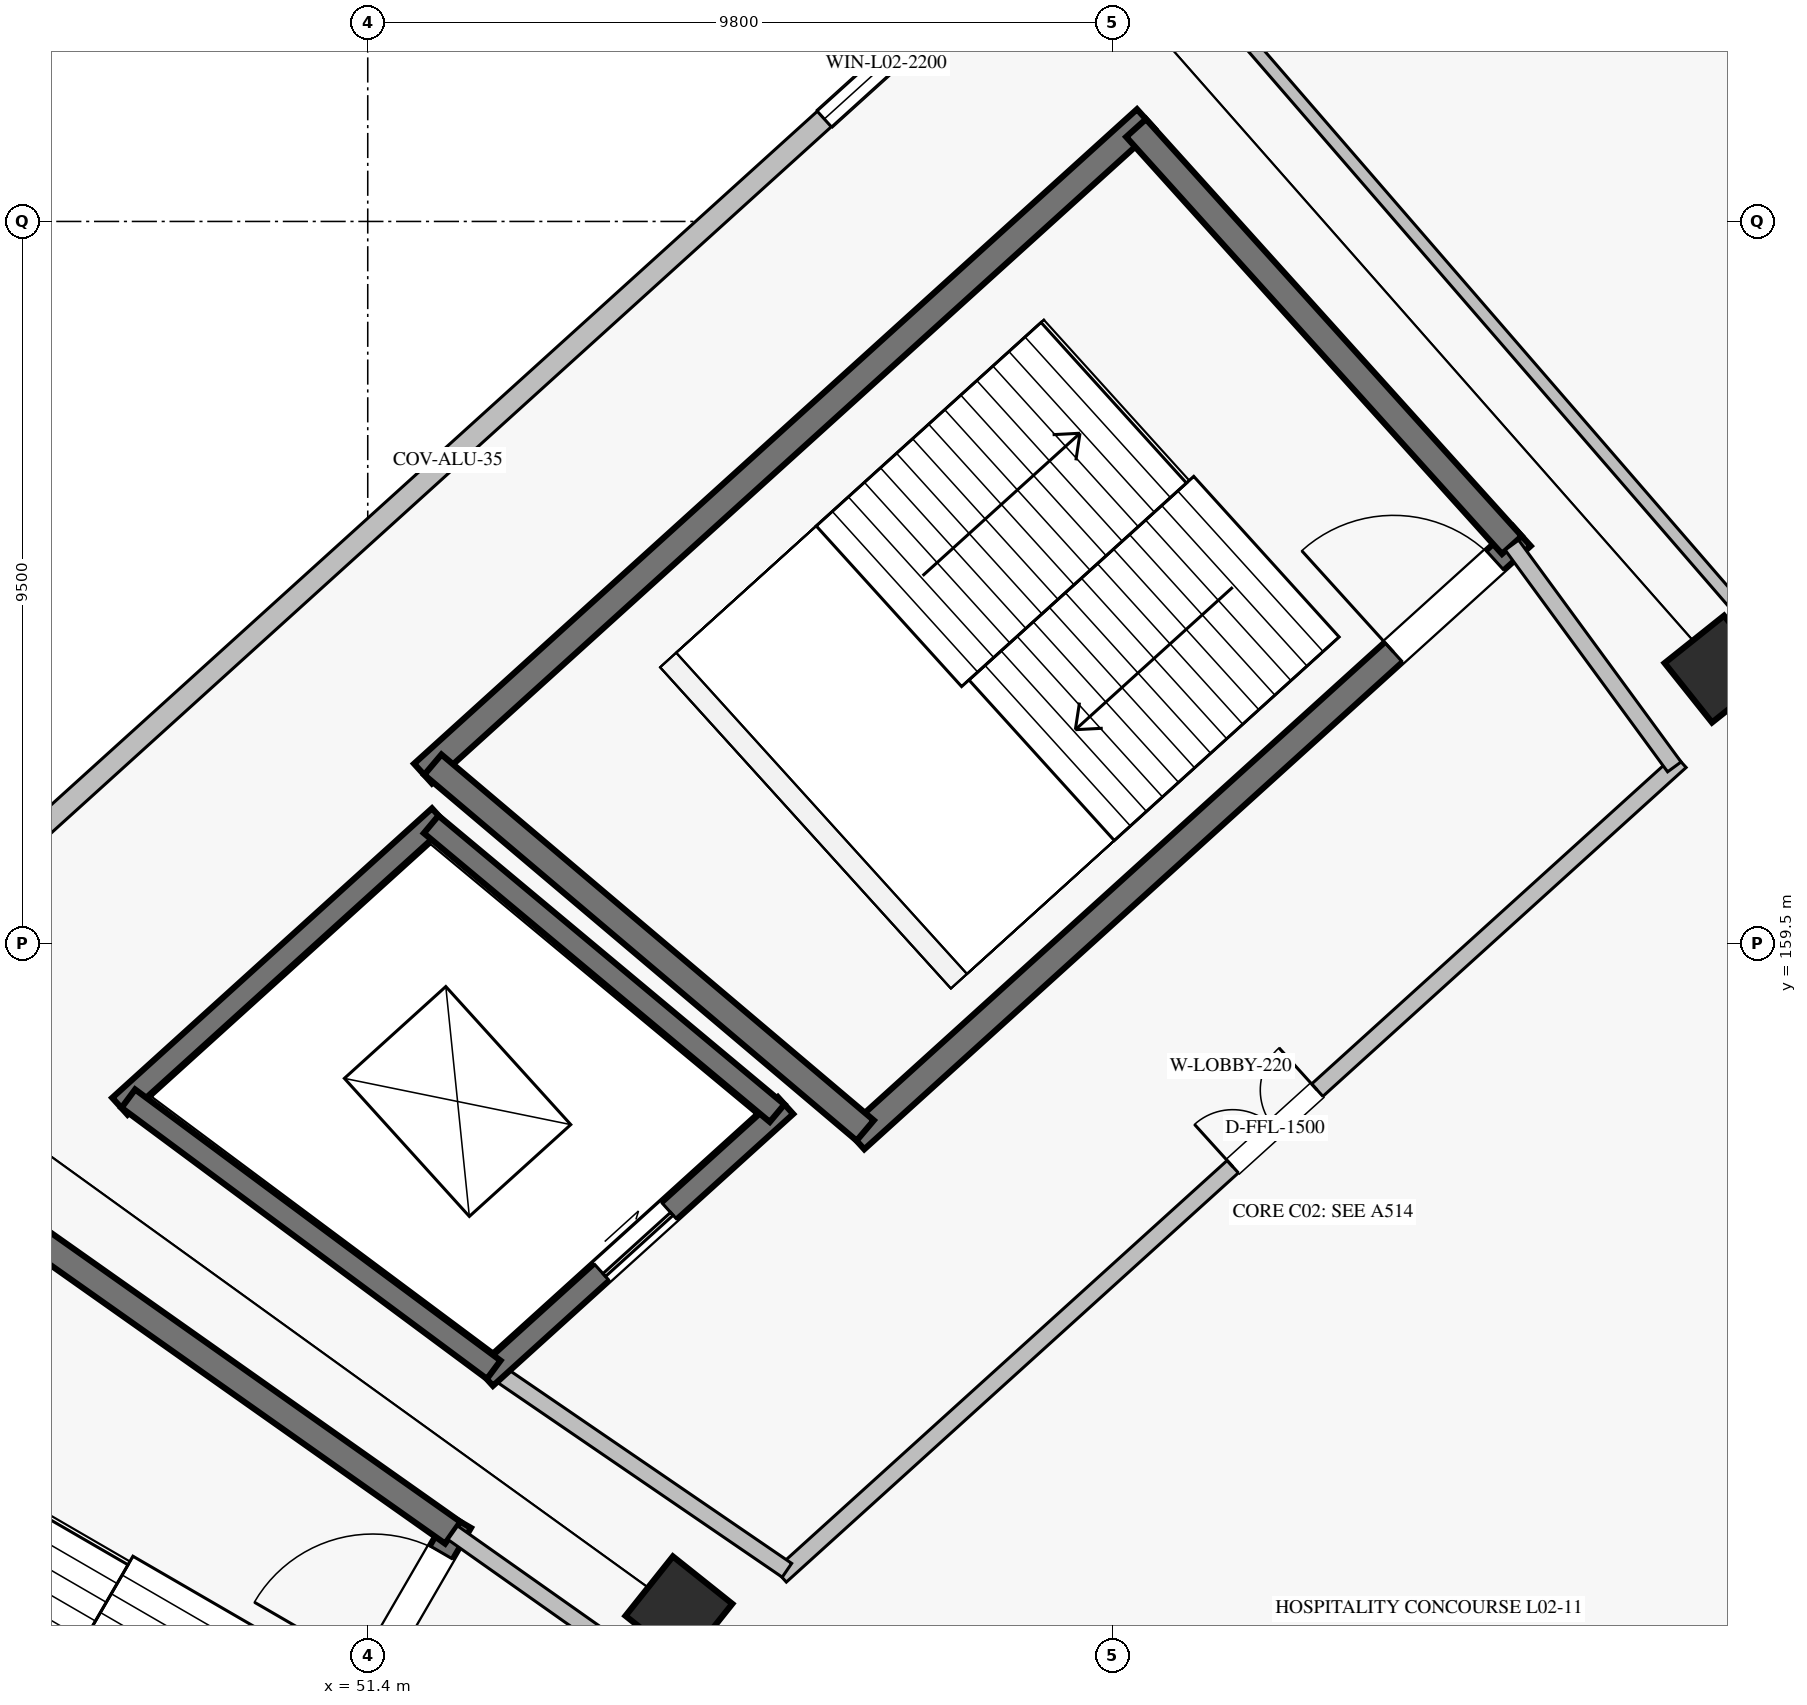
"""IFC4 building model, lengths in metres.
Left out: names, types, materials, properties, quantities, classifications, styles, units other than length and angle.
Written with IfcOpenShell. Run it as: python <this file> out.ifc"""

import sys

from ifc_helpers import new_model, si_unit, direction, frame, frame_2d, origin, origin_2d, place, context, subcontext, project, spatial, rectangle, extrude, element, fill, save


model = new_model("IFC4")
c1 = context("Model", 3, precision=1e-05, world=origin(), true_north=direction((0.0, 1.0)))
c2 = subcontext(c1, "Body", "Model", "MODEL_VIEW")
j1 = project(units=[si_unit("LENGTHUNIT", "METRE"), si_unit("PLANEANGLEUNIT", "RADIAN")], contexts=[c1])
p1 = place(None, origin())
s1 = spatial("IfcSite", under=j1, at=p1, CompositionType="ELEMENT")
p2 = place(p1, origin())
s2 = spatial("IfcBuilding", under=s1, at=p2, CompositionType="ELEMENT")
p3 = place(p2, frame((0.0, 0.0, 10.54)))
s3 = spatial("IfcBuildingStorey", under=s2, at=p3, CompositionType="ELEMENT", Elevation=10.54)
for number, where, z_axis, x_axis in (
    (1, (69.166, 163.111, 0.0), (0.0, 0.0, 1.0), (-0.623, 0.782, 0.0)),
    (2, (55.494, 150.734, 0.0), (0.0, 0.0, 1.0), (-0.782, 0.623, 0.0)),
):
    element("IfcColumn", number, at=place(p3, frame(where, z_axis=z_axis, x_axis=x_axis)), inside=s3, PredefinedType="COLUMN", context=c2, shape_type="SweptSolid", body=[
        extrude(rectangle(XDim=1.0, YDim=1.0, at=origin_2d()), origin(), (0.0, 0.0, 1.0), 5.1),
    ])
p4 = place(p3, frame((60.076, 172.764, 0.0), z_axis=(0.0, 0.0, 1.0), x_axis=(-0.741352367697, -0.671115986183, 0.0)))
e3 = element("IfcWall", 3, at=p4, inside=s3, PredefinedType="SOLIDWALL", context=c2, shape_type="SweptSolid", body=[
    extrude(rectangle(XDim=20.564, YDim=0.275, at=frame_2d((10.282, 0.0))), origin(), (0.0, 0.0, 1.0), 4.138),
])
p5 = place(p4, frame((1.4, 0.0, 1.0)))
e4 = element("IfcOpeningElement", 4, at=p5, cuts=e3, PredefinedType="OPENING", context=c2, shape_type="SweptSolid", body=[
    extrude(rectangle(XDim=2.2, YDim=1.7, at=frame_2d((1.1, 0.85))), frame((0.0, 0.147, 0.0), z_axis=(0.0, -1.0, 0.0), x_axis=(1.0, 0.0, 0.0)), (0.0, 0.0, 1.0), 0.295),
])
p6 = place(p3, frame((66.583, 164.86, 0.0), z_axis=(0.0, 0.0, 1.0), x_axis=(-0.741348929385, -0.671119784315, 0.0)))
e5 = element("IfcWall", 5, at=p6, inside=s3, PredefinedType="SHEAR", context=c2, shape_type="SweptSolid", body=[
    extrude(rectangle(XDim=11.826, YDim=0.35, at=frame_2d((5.913, 0.0))), origin(), (0.0, 0.0, 1.0), 4.84),
])
p7 = place(p6, frame((0.475, 0.0, 0.0)))
e6 = element("IfcOpeningElement", 6, at=p7, cuts=e5, PredefinedType="OPENING", context=c2, shape_type="SweptSolid", body=[
    extrude(rectangle(XDim=1.8, YDim=2.2, at=frame_2d((0.9, 1.1))), frame((0.0, 0.185, 0.0), z_axis=(0.0, -1.0, 0.0), x_axis=(1.0, 0.0, 0.0)), (0.0, 0.0, 1.0), 0.37),
])
p8 = place(p3, frame((61.639, 170.347, 0.0), z_axis=(0.0, 0.0, 1.0), x_axis=(-0.741351373721, -0.671117084183, 0.0)))
e7 = element("IfcWall", 7, at=p8, inside=s3, PredefinedType="SHEAR", context=c2, shape_type="SweptSolid", body=[
    extrude(rectangle(XDim=12.83, YDim=0.35, at=frame_2d((6.415, 0.0))), origin(), (0.0, 0.0, 1.0), 4.84),
])
p9 = place(p3, frame((66.454, 164.743, 0.0), z_axis=(0.0, 0.0, 1.0), x_axis=(-0.669463145673, 0.742845270958, 0.0)))
e8 = element("IfcWall", 8, at=p9, inside=s3, PredefinedType="SHEAR", context=c2, shape_type="SweptSolid", body=[
    extrude(rectangle(XDim=7.386, YDim=0.35, at=frame_2d((3.693, 0.0))), origin(), (0.0, 0.0, 1.0), 4.84),
])
p10 = place(p3, frame((57.945, 157.041, 0.0), z_axis=(0.0, 0.0, 1.0), x_axis=(-0.763422324031, 0.64589964791, 0.0)))
e9 = element("IfcWall", 9, at=p10, inside=s3, PredefinedType="SHEAR", context=c2, shape_type="SweptSolid", body=[
    extrude(rectangle(XDim=7.452, YDim=0.35, at=frame_2d((3.726, 0.0))), origin(), (0.0, 0.0, 1.0), 4.84),
])
p11 = place(p3, frame((56.897, 157.369, 0.0), z_axis=(0.0, 0.0, 1.0), x_axis=(-0.741350155641, -0.671118429736, 0.0)))
e10 = element("IfcWall", 10, at=p11, inside=s3, PredefinedType="SHEAR", context=c2, shape_type="SweptSolid", body=[
    extrude(rectangle(XDim=5.329, YDim=0.3, at=frame_2d((2.665, 0.0))), origin(), (0.0, 0.0, 1.0), 4.84),
])
p12 = place(p11, frame((2.065, 0.0, 0.0)))
e11 = element("IfcOpeningElement", 11, at=p12, cuts=e10, PredefinedType="OPENING", context=c2, shape_type="SweptSolid", body=[
    extrude(rectangle(XDim=1.2, YDim=2.2, at=frame_2d((0.6, 1.1))), frame((0.0, 0.16, 0.0), z_axis=(0.0, -1.0, 0.0), x_axis=(1.0, 0.0, 0.0)), (0.0, 0.0, 1.0), 0.32),
])
p13 = place(p3, frame((52.346, 161.168, 0.0), z_axis=(0.0, 0.0, 1.0), x_axis=(-0.74134208775, -0.671127341815, 0.0)))
e12 = element("IfcWall", 12, at=p13, inside=s3, PredefinedType="SHEAR", context=c2, shape_type="SweptSolid", body=[
    extrude(rectangle(XDim=5.675, YDim=0.3, at=frame_2d((2.837, 0.0))), origin(), (0.0, 0.0, 1.0), 4.84),
])
p14 = place(p3, frame((56.786, 157.268, 0.0), z_axis=(0.0, 0.0, 1.0), x_axis=(-0.767711354146, 0.640795815151, 0.0)))
e13 = element("IfcWall", 13, at=p14, inside=s3, PredefinedType="SHEAR", context=c2, shape_type="SweptSolid", body=[
    extrude(rectangle(XDim=5.929, YDim=0.3, at=frame_2d((2.964, 0.0))), origin(), (0.0, 0.0, 1.0), 4.84),
])
p15 = place(p3, frame((53.058, 153.893, 0.0), z_axis=(0.0, 0.0, 1.0), x_axis=(-0.803101805449, 0.59584183311, 0.0)))
e14 = element("IfcWall", 14, at=p15, inside=s3, PredefinedType="SHEAR", context=c2, shape_type="SweptSolid", body=[
    extrude(rectangle(XDim=5.986, YDim=0.3, at=frame_2d((2.993, 0.0))), origin(), (0.0, 0.0, 1.0), 4.84),
])
p16 = place(p3, frame((68.673, 161.898, 0.0), z_axis=(0.0, 0.0, 1.0), x_axis=(-0.741351035574, -0.671117457717, 0.0)))
e15 = element("IfcWall", 15, at=p16, inside=s3, PredefinedType="SOLIDWALL", context=c2, shape_type="SweptSolid", body=[
    extrude(rectangle(XDim=15.969, YDim=0.22, at=frame_2d((7.985, 0.0))), origin(), (0.0, 0.0, 1.0), 4.84),
])
p17 = place(p16, frame((6.447, 0.0, 0.0)))
e16 = element("IfcOpeningElement", 16, at=p17, cuts=e15, PredefinedType="OPENING", context=c2, shape_type="SweptSolid", body=[
    extrude(rectangle(XDim=1.5, YDim=2.2, at=frame_2d((0.75, 1.1))), frame((0.0, 0.12, 0.0), z_axis=(0.0, -1.0, 0.0), x_axis=(1.0, 0.0, 0.0)), (0.0, 0.0, 1.0), 0.24),
])
p18 = place(p3, frame((68.591, 161.824, 0.0), z_axis=(0.0, 0.0, 1.0), x_axis=(-0.590836915359, 0.806791013491, 0.0)))
e17 = element("IfcWall", 17, at=p18, inside=s3, PredefinedType="SOLIDWALL", context=c2, shape_type="SweptSolid", body=[
    extrude(rectangle(XDim=3.618, YDim=0.22, at=frame_2d((1.809, 0.0))), origin(), (0.0, 0.0, 1.0), 4.84),
])
p19 = place(p3, frame((56.915, 151.254, 0.0), z_axis=(0.0, 0.0, 1.0), x_axis=(-0.825385410642, 0.564569680287, 0.0)))
e18 = element("IfcWall", 18, at=p19, inside=s3, PredefinedType="SOLIDWALL", context=c2, shape_type="SweptSolid", body=[
    extrude(rectangle(XDim=4.674, YDim=0.22, at=frame_2d((2.337, 0.0))), origin(), (0.0, 0.0, 1.0), 4.84),
])
p20 = place(p3, frame((52.606, 151.9, 0.0), z_axis=(0.0, 0.0, 1.0), x_axis=(-0.501587404838, -0.865106973332, 0.0)))
e19 = element("IfcWall", 19, at=p20, inside=s3, PredefinedType="SHEAR", context=c2, shape_type="SweptSolid", body=[
    extrude(rectangle(XDim=11.435, YDim=0.35, at=frame_2d((5.718, 0.0))), origin(), (0.0, 0.0, 1.0), 4.84),
])
p21 = place(p20, frame((0.475, 0.0, 0.0)))
e20 = element("IfcOpeningElement", 20, at=p21, cuts=e19, PredefinedType="OPENING", context=c2, shape_type="SweptSolid", body=[
    extrude(rectangle(XDim=1.8, YDim=2.2, at=frame_2d((0.9, 1.1))), frame((0.0, 0.185, 0.0), z_axis=(0.0, -1.0, 0.0), x_axis=(1.0, 0.0, 0.0)), (0.0, 0.0, 1.0), 0.37),
])
p22 = place(p3, frame((52.519, 151.748, 0.0), z_axis=(0.0, 0.0, 1.0), x_axis=(-0.816983109824, 0.576661597701, 0.0)))
e21 = element("IfcWall", 21, at=p22, inside=s3, PredefinedType="SHEAR", context=c2, shape_type="SweptSolid", body=[
    extrude(rectangle(XDim=7.544, YDim=0.35, at=frame_2d((3.772, 0.0))), origin(), (0.0, 0.0, 1.0), 4.84),
])
p23 = place(p3, frame((54.889, 150.075, 0.0), z_axis=(0.0, 0.0, 1.0), x_axis=(-0.816984187086, 0.57666007149, 0.0)))
e22 = element("IfcWall", 22, at=p23, inside=s3, PredefinedType="SOLIDWALL", context=c2, shape_type="SweptSolid", body=[
    extrude(rectangle(XDim=2.901, YDim=0.22, at=frame_2d((1.451, 0.0))), origin(), (0.0, 0.0, 1.0), 4.84),
])
p24 = place(p3, frame((69.599, 163.72, 0.0), z_axis=(0.0, 0.0, 1.0), x_axis=(-0.654293035882, 0.756241114458, 0.0)))
e23 = element("IfcWall", 23, at=p24, inside=s3, PredefinedType="PARTITIONING", context=c2, shape_type="SweptSolid", body=[
    extrude(rectangle(XDim=12.091, YDim=0.165, at=frame_2d((6.045, 0.0))), origin(), (0.0, 0.0, 1.0), 4.16),
])
p25 = place(p5, origin())
e24 = element("IfcWindow", 24, at=p25, inside=s3, PartitioningType="SINGLE_PANEL", PredefinedType="WINDOW", context=c2, shape_type="SweptSolid", body=[
    extrude(rectangle(XDim=2.2, YDim=1.7, at=frame_2d((1.1, 0.85))), frame((0.0, 0.03, 0.0), z_axis=(0.0, -1.0, 0.0), x_axis=(1.0, 0.0, 0.0)), (0.0, 0.0, 1.0), 0.06),
])
fill(e4, e24)
p26 = place(p7, frame((1.8, 0.0, 0.0), z_axis=(0.0, 0.0, 1.0), x_axis=(-1.0, 0.0, 0.0)))
e25 = element("IfcDoor", 25, at=p26, inside=s3, OperationType="SINGLE_SWING_LEFT", PredefinedType="DOOR", context=c2, shape_type="SweptSolid", body=[
    extrude(rectangle(XDim=1.8, YDim=2.2, at=frame_2d((0.9, 1.1))), frame((0.0, 0.025, 0.0), z_axis=(0.0, -1.0, 0.0), x_axis=(1.0, 0.0, 0.0)), (0.0, 0.0, 1.0), 0.05),
])
fill(e6, e25)
p27 = place(p12, origin())
e26 = element("IfcDoor", 26, at=p27, inside=s3, OperationType="SLIDING_TO_LEFT", PredefinedType="DOOR", context=c2, shape_type="SweptSolid", body=[
    extrude(rectangle(XDim=1.2, YDim=2.2, at=frame_2d((0.6, 1.1))), frame((0.0, 0.025, 0.0), z_axis=(0.0, -1.0, 0.0), x_axis=(1.0, 0.0, 0.0)), (0.0, 0.0, 1.0), 0.05),
])
fill(e11, e26)
p28 = place(p17, frame((1.5, 0.0, 0.0), z_axis=(0.0, 0.0, 1.0), x_axis=(-1.0, 0.0, 0.0)))
e27 = element("IfcDoor", 27, at=p28, inside=s3, OperationType="DOUBLE_DOOR_SINGLE_SWING", PredefinedType="DOOR", context=c2, shape_type="SweptSolid", body=[
    extrude(rectangle(XDim=1.5, YDim=2.2, at=frame_2d((0.75, 1.1))), frame((0.0, 0.025, 0.0), z_axis=(0.0, -1.0, 0.0), x_axis=(1.0, 0.0, 0.0)), (0.0, 0.0, 1.0), 0.05),
])
fill(e16, e27)
p29 = place(p21, frame((1.8, 0.0, 0.0), z_axis=(0.0, 0.0, 1.0), x_axis=(-1.0, 0.0, 0.0)))
e28 = element("IfcDoor", 28, at=p29, inside=s3, OperationType="SINGLE_SWING_LEFT", PredefinedType="DOOR", context=c2, shape_type="SweptSolid", body=[
    extrude(rectangle(XDim=1.8, YDim=2.2, at=frame_2d((0.9, 1.1))), frame((0.0, 0.025, 0.0), z_axis=(0.0, -1.0, 0.0), x_axis=(1.0, 0.0, 0.0)), (0.0, 0.0, 1.0), 0.05),
])
fill(e20, e28)
save(model, sys.argv[1])
